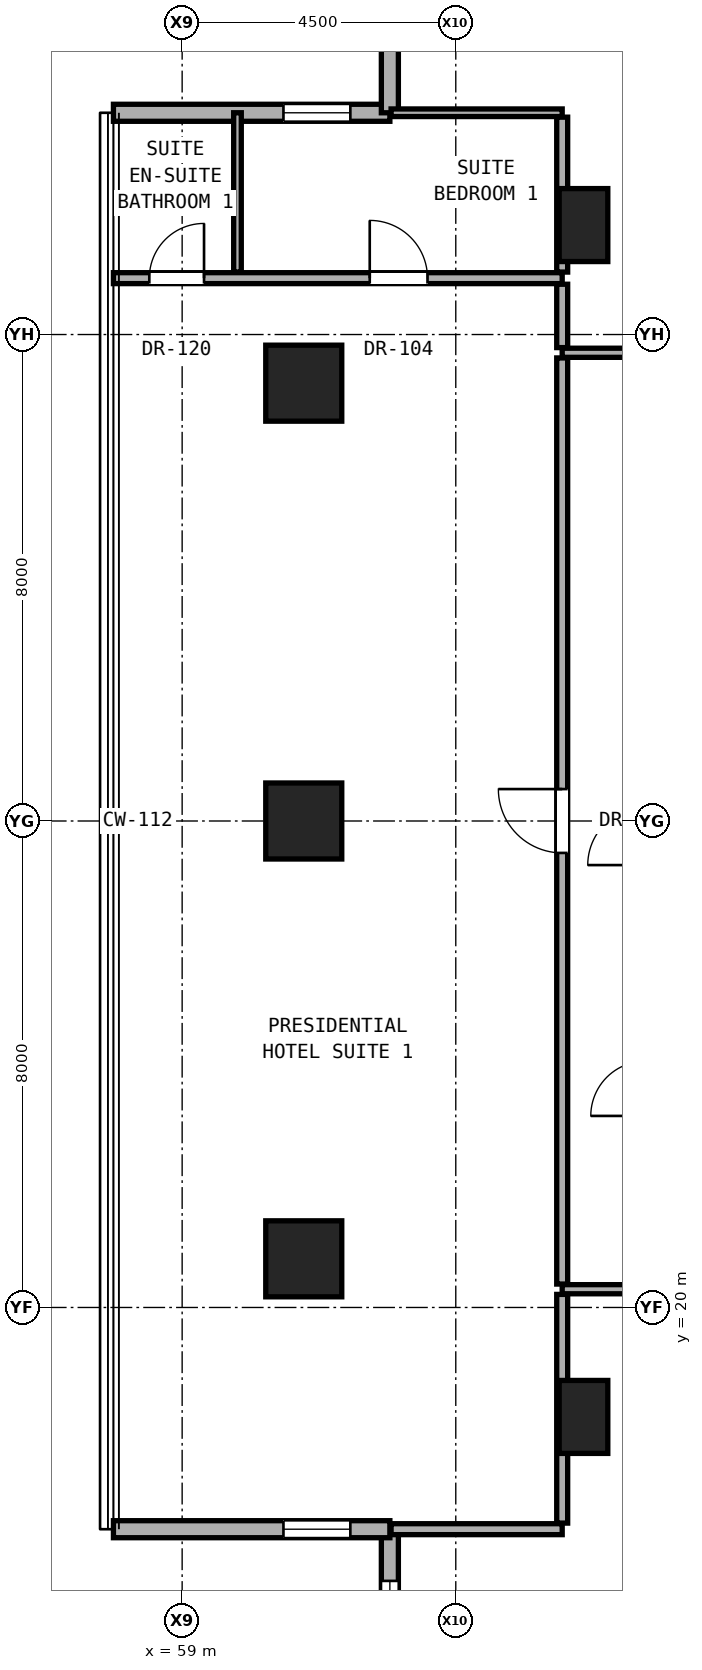
"""IFC4 building model, lengths in metres.
Left out: names, types, materials, properties, quantities, classifications, styles, units other than length and angle.
Written with IfcOpenShell. Run it as: python <this file> out.ifc"""

import sys

from ifc_helpers import new_model, si_unit, direction, frame, frame_2d, origin, origin_2d, place, context, subcontext, project, spatial, rectangle, hollow_rectangle, extrude, element, fill, save


model = new_model("IFC4")
c1 = context("Model", 3, precision=1e-05, world=origin(), true_north=direction((0.0, 1.0)))
c2 = subcontext(c1, "Body", "Model", "MODEL_VIEW")
j1 = project(units=[si_unit("LENGTHUNIT", "METRE"), si_unit("PLANEANGLEUNIT", "RADIAN")], contexts=[c1])
p1 = place(None, origin())
s1 = spatial("IfcSite", under=j1, at=p1, CompositionType="ELEMENT")
p2 = place(p1, origin())
s2 = spatial("IfcBuilding", under=s1, at=p2, CompositionType="ELEMENT")
p3 = place(p2, frame((0.0, 0.0, 68.6)))
s3 = spatial("IfcBuildingStorey", under=s2, at=p3, CompositionType="ELEMENT", Elevation=68.6)
for number, where, z_axis, x_axis in (
    (1, (61.0, 20.8, 0.0), (0.0, 0.0, 1.0), (1.0, 0.0, 0.0)),
    (2, (61.0, 28.0, 0.0), (0.0, 0.0, 1.0), (1.0, 0.0, 0.0)),
    (3, (61.0, 35.2, 0.0), (0.0, 0.0, 1.0), (1.0, 0.0, 0.0)),
):
    element("IfcColumn", number, at=place(p3, frame(where, z_axis=z_axis, x_axis=x_axis)), inside=s3, PredefinedType="COLUMN", context=c2, shape_type="SweptSolid", body=[
        extrude(hollow_rectangle(XDim=1.25, YDim=1.25, WallThickness=0.07, at=origin_2d()), origin(), (0.0, 0.0, 1.0), 3.3),
    ])
for number, where, z_axis, x_axis in (
    (4, (65.6, 18.2, 0.0), (0.0, 0.0, 1.0), (1.0, 0.0, 0.0)),
    (5, (65.6, 37.8, 0.0), (0.0, 0.0, 1.0), (1.0, 0.0, 0.0)),
):
    element("IfcColumn", number, at=place(p3, frame(where, z_axis=z_axis, x_axis=x_axis)), inside=s3, PredefinedType="PILASTER", context=c2, shape_type="SweptSolid", body=[
        extrude(rectangle(XDim=0.8, YDim=1.2, at=origin_2d()), origin(), (0.0, 0.0, 1.0), 3.3),
    ])
p4 = place(p3, frame((62.416, 16.354, 0.0), z_axis=(0.0, 0.0, 1.0), x_axis=(0.0, -1.0, 0.0)))
e6 = element("IfcWall", 6, at=p4, inside=s3, PredefinedType="SOLIDWALL", context=c2, shape_type="SweptSolid", body=[
    extrude(rectangle(XDim=4.546, YDim=0.28, at=frame_2d((2.273, 0.0))), origin(), (0.0, 0.0, 1.0), 3.04),
])
p5 = place(p4, frame((0.85, 0.0, 0.79)))
e7 = element("IfcOpeningElement", 7, at=p5, cuts=e6, PredefinedType="OPENING", context=c2, shape_type="SweptSolid", body=[
    extrude(rectangle(XDim=1.5, YDim=2.1, at=frame_2d((0.75, 1.05))), frame((0.0, 0.15, 0.0), z_axis=(0.0, -1.0, 0.0), x_axis=(1.0, 0.0, 0.0)), (0.0, 0.0, 1.0), 0.3),
])
p6 = place(p3, frame((57.87, 16.354, 0.0), z_axis=(0.0, 0.0, 1.0), x_axis=(1.0, 0.0, 0.0)))
e8 = element("IfcWall", 8, at=p6, inside=s3, PredefinedType="SOLIDWALL", context=c2, shape_type="SweptSolid", body=[
    extrude(rectangle(XDim=4.546, YDim=0.28, at=frame_2d((2.273, 0.0))), origin(), (0.0, 0.0, 1.0), 3.04),
])
p7 = place(p6, frame((2.796, 0.0, 0.85)))
e9 = element("IfcOpeningElement", 9, at=p7, cuts=e8, PredefinedType="OPENING", context=c2, shape_type="SweptSolid", body=[
    extrude(rectangle(XDim=1.1, YDim=2.0, at=frame_2d((0.55, 1.0))), frame((0.0, 0.15, 0.0), z_axis=(0.0, -1.0, 0.0), x_axis=(1.0, 0.0, 0.0)), (0.0, 0.0, 1.0), 0.3),
])
p8 = place(p3, frame((62.416, 39.646, 0.0), z_axis=(0.0, 0.0, 1.0), x_axis=(-1.0, 0.0, 0.0)))
e10 = element("IfcWall", 10, at=p8, inside=s3, PredefinedType="SOLIDWALL", context=c2, shape_type="SweptSolid", body=[
    extrude(rectangle(XDim=4.546, YDim=0.28, at=frame_2d((2.273, 0.0))), origin(), (0.0, 0.0, 1.0), 3.04),
])
p9 = place(p8, frame((0.65, 0.0, 0.85)))
e11 = element("IfcOpeningElement", 11, at=p9, cuts=e10, PredefinedType="OPENING", context=c2, shape_type="SweptSolid", body=[
    extrude(rectangle(XDim=1.1, YDim=2.0, at=frame_2d((0.55, 1.0))), frame((0.0, 0.15, 0.0), z_axis=(0.0, -1.0, 0.0), x_axis=(1.0, 0.0, 0.0)), (0.0, 0.0, 1.0), 0.3),
])
p10 = place(p3, frame((62.416, 44.192, 0.0), z_axis=(0.0, 0.0, 1.0), x_axis=(0.0, -1.0, 0.0)))
e12 = element("IfcWall", 12, at=p10, inside=s3, PredefinedType="SOLIDWALL", context=c2, shape_type="SweptSolid", body=[
    extrude(rectangle(XDim=4.546, YDim=0.28, at=frame_2d((2.273, 0.0))), origin(), (0.0, 0.0, 1.0), 3.04),
])
p11 = place(p3, frame((62.436, 16.354, 0.0), z_axis=(0.0, 0.0, 1.0), x_axis=(1.0, 0.0, 0.0)))
e13 = element("IfcWall", 13, at=p11, inside=s3, PredefinedType="PARTITIONING", context=c2, shape_type="SweptSolid", body=[
    extrude(rectangle(XDim=2.814, YDim=0.18, at=frame_2d((1.407, 0.0))), origin(), (0.0, 0.0, 1.0), 3.06),
])
for number, where, z_axis, x_axis in (
    (14, (65.25, 20.3, 0.0), (0.0, 0.0, 1.0), (1.0, 0.0, 0.0)),
    (15, (65.25, 35.7, 0.0), (0.0, 0.0, 1.0), (1.0, 0.0, 0.0)),
):
    element("IfcWall", number, at=place(p3, frame(where, z_axis=z_axis, x_axis=x_axis)), inside=s3, PredefinedType="PARTITIONING", context=c2, shape_type="SweptSolid", body=[
        extrude(rectangle(XDim=1.37, YDim=0.15, at=frame_2d((0.685, 0.0))), origin(), (0.0, 0.0, 1.0), 3.06),
    ])
p12 = place(p3, frame((57.87, 36.927, 0.0), z_axis=(0.0, 0.0, 1.0), x_axis=(1.0, 0.0, 0.0)))
e16 = element("IfcWall", 16, at=p12, inside=s3, PredefinedType="PARTITIONING", context=c2, shape_type="SweptSolid", body=[
    extrude(rectangle(XDim=7.38, YDim=0.18, at=frame_2d((3.69, 0.0))), origin(), (0.0, 0.0, 1.0), 2.436),
])
p13 = place(p12, frame((4.215, 0.0, 0.0)))
e17 = element("IfcOpeningElement", 17, at=p13, cuts=e16, PredefinedType="OPENING", context=c2, shape_type="SweptSolid", body=[
    extrude(rectangle(XDim=0.95, YDim=2.15, at=frame_2d((0.475, 1.075))), frame((0.0, 0.1, 0.0), z_axis=(0.0, -1.0, 0.0), x_axis=(1.0, 0.0, 0.0)), (0.0, 0.0, 1.0), 0.2),
])
p14 = place(p12, frame((0.59, 0.0, 0.0)))
e18 = element("IfcOpeningElement", 18, at=p14, cuts=e16, PredefinedType="OPENING", context=c2, shape_type="SweptSolid", body=[
    extrude(rectangle(XDim=0.9, YDim=2.1, at=frame_2d((0.45, 1.05))), frame((0.0, 0.1, 0.0), z_axis=(0.0, -1.0, 0.0), x_axis=(1.0, 0.0, 0.0)), (0.0, 0.0, 1.0), 0.2),
])
p15 = place(p3, frame((62.436, 39.647, 0.0), z_axis=(0.0, 0.0, 1.0), x_axis=(1.0, 0.0, 0.0)))
e19 = element("IfcWall", 19, at=p15, inside=s3, PredefinedType="PARTITIONING", context=c2, shape_type="SweptSolid", body=[
    extrude(rectangle(XDim=2.814, YDim=0.125, at=frame_2d((1.407, 0.0))), origin(), (0.0, 0.0, 1.0), 3.06),
])
p16 = place(p3, frame((59.91, 37.027, 0.0), z_axis=(0.0, 0.0, 1.0), x_axis=(0.0, 1.0, 0.0)))
e20 = element("IfcWall", 20, at=p16, inside=s3, PredefinedType="PARTITIONING", context=c2, shape_type="SweptSolid", body=[
    extrude(rectangle(XDim=2.62, YDim=0.125, at=frame_2d((1.31, 0.0))), origin(), (0.0, 0.0, 1.0), 3.06),
])
p17 = place(p3, frame((65.25, 16.454, 0.0), z_axis=(0.0, 0.0, 1.0), x_axis=(0.0, 1.0, 0.0)))
e21 = element("IfcWall", 21, at=p17, inside=s3, PredefinedType="PARTITIONING", context=c2, shape_type="SweptSolid", body=[
    extrude(rectangle(XDim=3.761, YDim=0.18, at=frame_2d((1.88, 0.0))), origin(), (0.0, 0.0, 1.0), 2.436),
])
p18 = place(p3, frame((65.25, 20.385, 0.0), z_axis=(0.0, 0.0, 1.0), x_axis=(0.0, 1.0, 0.0)))
e22 = element("IfcWall", 22, at=p18, inside=s3, PredefinedType="PARTITIONING", context=c2, shape_type="SweptSolid", body=[
    extrude(rectangle(XDim=15.23, YDim=0.18, at=frame_2d((7.615, 0.0))), origin(), (0.0, 0.0, 1.0), 2.279),
])
p19 = place(p18, frame((7.09, 0.0, 0.0)))
e23 = element("IfcOpeningElement", 23, at=p19, cuts=e22, PredefinedType="OPENING", context=c2, shape_type="SweptSolid", body=[
    extrude(rectangle(XDim=1.05, YDim=2.2, at=frame_2d((0.525, 1.1))), frame((0.0, 0.1, 0.0), z_axis=(0.0, -1.0, 0.0), x_axis=(1.0, 0.0, 0.0)), (0.0, 0.0, 1.0), 0.2),
])
p20 = place(p3, frame((65.25, 35.785, 0.0), z_axis=(0.0, 0.0, 1.0), x_axis=(0.0, 1.0, 0.0)))
e24 = element("IfcWall", 24, at=p20, inside=s3, PredefinedType="PARTITIONING", context=c2, shape_type="SweptSolid", body=[
    extrude(rectangle(XDim=1.042, YDim=0.18, at=frame_2d((0.521, 0.0))), origin(), (0.0, 0.0, 1.0), 3.06),
])
p21 = place(p3, frame((65.25, 37.027, 0.0), z_axis=(0.0, 0.0, 1.0), x_axis=(0.0, 1.0, 0.0)))
e25 = element("IfcWall", 25, at=p21, inside=s3, PredefinedType="PARTITIONING", context=c2, shape_type="SweptSolid", body=[
    extrude(rectangle(XDim=2.547, YDim=0.18, at=frame_2d((1.274, 0.0))), origin(), (0.0, 0.0, 1.0), 2.436),
])
p22 = place(p5, origin())
e26 = element("IfcWindow", 26, at=p22, inside=s3, PartitioningType="SINGLE_PANEL", PredefinedType="WINDOW", context=c2, shape_type="SweptSolid", body=[
    extrude(rectangle(XDim=1.5, YDim=2.1, at=frame_2d((0.75, 1.05))), frame((0.0, 0.03, 0.0), z_axis=(0.0, -1.0, 0.0), x_axis=(1.0, 0.0, 0.0)), (0.0, 0.0, 1.0), 0.06),
])
fill(e7, e26)
p23 = place(p7, origin())
e27 = element("IfcWindow", 27, at=p23, inside=s3, PartitioningType="SINGLE_PANEL", PredefinedType="WINDOW", context=c2, shape_type="SweptSolid", body=[
    extrude(rectangle(XDim=1.1, YDim=2.0, at=frame_2d((0.55, 1.0))), frame((0.0, 0.03, 0.0), z_axis=(0.0, -1.0, 0.0), x_axis=(1.0, 0.0, 0.0)), (0.0, 0.0, 1.0), 0.06),
])
fill(e9, e27)
p24 = place(p9, origin())
e28 = element("IfcWindow", 28, at=p24, inside=s3, PartitioningType="SINGLE_PANEL", PredefinedType="WINDOW", context=c2, shape_type="SweptSolid", body=[
    extrude(rectangle(XDim=1.1, YDim=2.0, at=frame_2d((0.55, 1.0))), frame((0.0, 0.03, 0.0), z_axis=(0.0, -1.0, 0.0), x_axis=(1.0, 0.0, 0.0)), (0.0, 0.0, 1.0), 0.06),
])
fill(e11, e28)
p25 = place(p19, origin())
e29 = element("IfcDoor", 29, at=p25, inside=s3, OperationType="SINGLE_SWING_RIGHT", PredefinedType="DOOR", context=c2, shape_type="SweptSolid", body=[
    extrude(rectangle(XDim=1.05, YDim=2.2, at=frame_2d((0.525, 1.1))), frame((0.0, 0.025, 0.0), z_axis=(0.0, -1.0, 0.0), x_axis=(1.0, 0.0, 0.0)), (0.0, 0.0, 1.0), 0.05),
])
fill(e23, e29)
p26 = place(p13, origin())
e30 = element("IfcDoor", 30, at=p26, inside=s3, OperationType="SINGLE_SWING_LEFT", PredefinedType="DOOR", context=c2, shape_type="SweptSolid", body=[
    extrude(rectangle(XDim=0.95, YDim=2.15, at=frame_2d((0.475, 1.075))), frame((0.0, 0.025, 0.0), z_axis=(0.0, -1.0, 0.0), x_axis=(1.0, 0.0, 0.0)), (0.0, 0.0, 1.0), 0.05),
])
fill(e17, e30)
p27 = place(p14, origin())
e31 = element("IfcDoor", 31, at=p27, inside=s3, OperationType="SINGLE_SWING_RIGHT", PredefinedType="DOOR", context=c2, shape_type="SweptSolid", body=[
    extrude(rectangle(XDim=0.9, YDim=2.1, at=frame_2d((0.45, 1.05))), frame((0.0, 0.025, 0.0), z_axis=(0.0, -1.0, 0.0), x_axis=(1.0, 0.0, 0.0)), (0.0, 0.0, 1.0), 0.05),
])
fill(e18, e31)
save(model, sys.argv[1])
